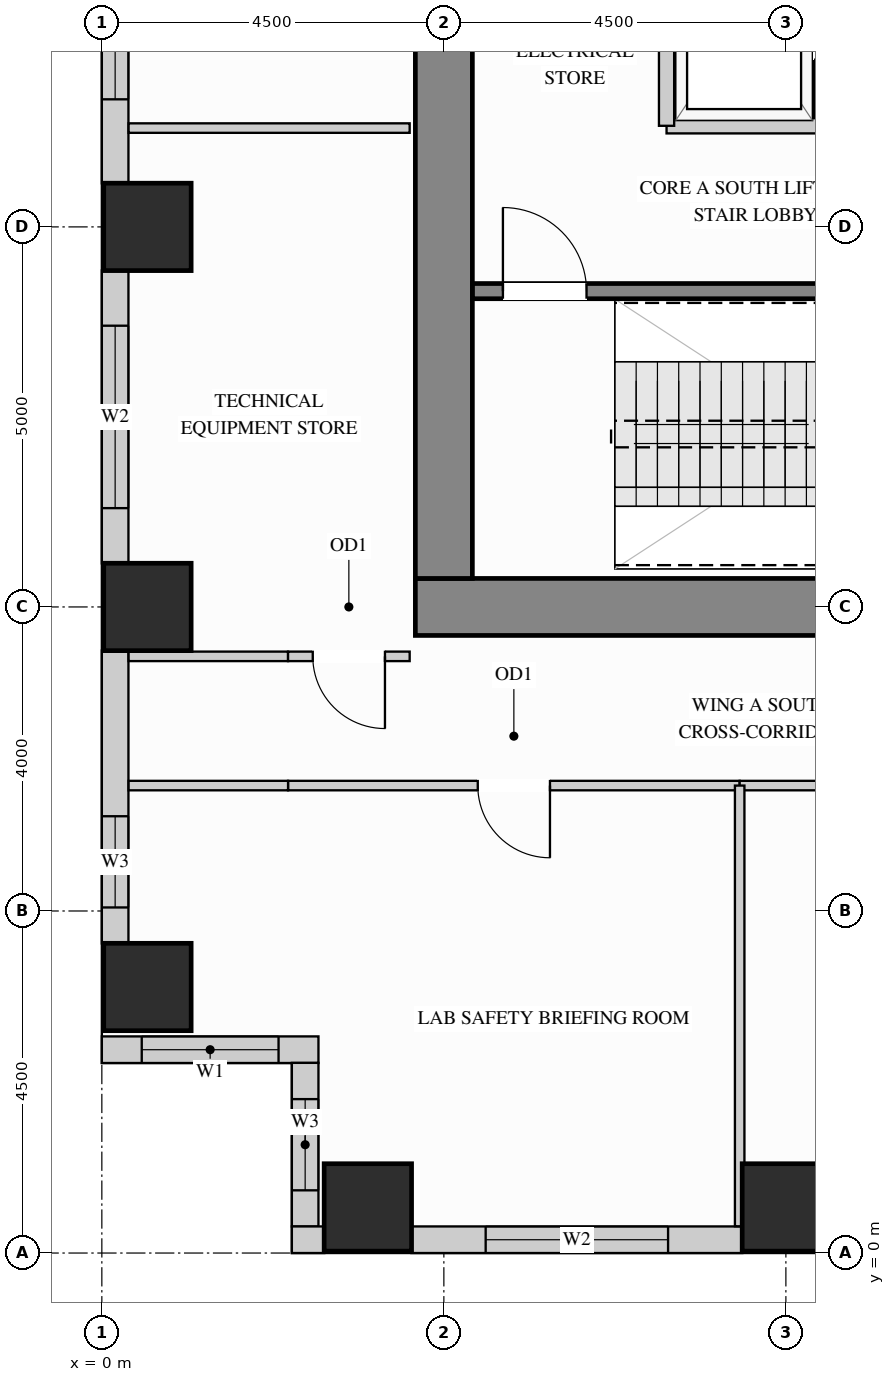
"""IFC4 building model, lengths in metres.
Left out: names, types, materials, properties, quantities, classifications, styles, units other than length and angle.
Written with IfcOpenShell. Run it as: python <this file> out.ifc"""

import sys

from ifc_helpers import new_model, si_unit, direction, frame, frame_2d, origin, origin_2d, place, context, subcontext, project, spatial, rectangle, extrude, source, transform, mapped, element, fill, save


model = new_model("IFC4")
c1 = context("Model", 3, precision=1e-05, world=origin(), true_north=direction((0.0, 1.0)))
c2 = subcontext(c1, "Body", "Model", "MODEL_VIEW")
j1 = project(units=[si_unit("LENGTHUNIT", "METRE"), si_unit("PLANEANGLEUNIT", "RADIAN")], contexts=[c1])
p1 = place(None, origin())
s1 = spatial("IfcSite", under=j1, at=p1, CompositionType="ELEMENT")
p2 = place(p1, origin())
s2 = spatial("IfcBuilding", under=s1, at=p2, CompositionType="ELEMENT")
p3 = place(p2, frame((0.0, 0.0, 120.6)))
s3 = spatial("IfcBuildingStorey", under=s2, at=p3, CompositionType="ELEMENT", Elevation=120.6)
m1 = source(origin(), c2, "Body", "SweptSolid", [
    extrude(rectangle(XDim=1.15, YDim=1.15, at=origin_2d()), origin(), (0.0, 0.0, 1.0), 3.38),
])
for number, where, z_axis, x_axis in (
    (1, (3.5, 0.6, 0.0), (0.0, 0.0, 1.0), (1.0, 0.0, 0.0)),
    (2, (9.0, 0.6, 0.0), (0.0, 0.0, 1.0), (1.0, 0.0, 0.0)),
    (3, (0.6, 13.5, 0.0), (0.0, 0.0, 1.0), (1.0, 0.0, 0.0)),
    (4, (0.6, 3.5, 0.0), (0.0, 0.0, 1.0), (1.0, 0.0, 0.0)),
    (5, (0.6, 8.5, 0.0), (0.0, 0.0, 1.0), (1.0, 0.0, 0.0)),
):
    element("IfcColumn", number, at=place(p3, frame(where, z_axis=z_axis, x_axis=x_axis)), inside=s3, PredefinedType="COLUMN", context=c2, shape_type="MappedRepresentation", body=[
        mapped(m1, transform((0.0, 0.0, 0.0), x_axis=(1.0, 0.0, 0.0), y_axis=(0.0, 1.0, 0.0), z_axis=(0.0, 0.0, 1.0))),
    ])
m2 = source(origin(), c2, "Body", "SweptSolid", [
    extrude(rectangle(XDim=10.75, YDim=0.75, at=frame_2d((5.375, 0.0))), origin(), (0.0, 0.0, 1.0), 3.38),
])
p4 = place(p3, frame((4.125, 8.5, 0.0), z_axis=(0.0, 0.0, 1.0), x_axis=(1.0, 0.0, 0.0)))
e6 = element("IfcWall", 6, at=p4, inside=s3, PredefinedType="SHEAR", context=c2, shape_type="MappedRepresentation", body=[
    mapped(m2, transform((0.0, 0.0, 0.0), x_axis=(1.0, 0.0, 0.0), y_axis=(0.0, 1.0, 0.0), z_axis=(0.0, 0.0, 1.0))),
])
m3 = source(origin(), c2, "Body", "SweptSolid", [
    extrude(rectangle(XDim=20.25, YDim=0.75, at=frame_2d((10.125, 0.0))), origin(), (0.0, 0.0, 1.0), 3.38),
])
p5 = place(p3, frame((4.5, 8.875, 0.0), z_axis=(0.0, 0.0, 1.0), x_axis=(0.0, 1.0, 0.0)))
e7 = element("IfcWall", 7, at=p5, inside=s3, PredefinedType="SHEAR", context=c2, shape_type="MappedRepresentation", body=[
    mapped(m3, transform((0.0, 0.0, 0.0), x_axis=(1.0, 0.0, 0.0), y_axis=(0.0, 1.0, 0.0), z_axis=(0.0, 0.0, 1.0))),
])
p6 = place(p3, frame((0.175, 17.427, 0.0), z_axis=(0.0, 0.0, 1.0), x_axis=(0.0, -1.0, 0.0)))
e8 = element("IfcWall", 8, at=p6, inside=s3, PredefinedType="SOLIDWALL", context=c2, shape_type="SweptSolid", body=[
    extrude(rectangle(XDim=3.354, YDim=0.35, at=frame_2d((1.677, 0.0))), origin(), (0.0, 0.0, 1.0), 3.365),
])
p7 = place(p6, frame((0.448, 0.0, 0.78)))
e9 = element("IfcOpeningElement", 9, at=p7, cuts=e8, PredefinedType="OPENING", context=c2, shape_type="SweptSolid", body=[
    extrude(rectangle(XDim=1.8, YDim=2.1, at=frame_2d((0.9, 1.05))), frame((0.0, 0.185, 0.0), z_axis=(0.0, -1.0, 0.0), x_axis=(1.0, 0.0, 0.0)), (0.0, 0.0, 1.0), 0.37),
])
p8 = place(p3, frame((0.175, 12.927, 0.0), z_axis=(0.0, 0.0, 1.0), x_axis=(0.0, -1.0, 0.0)))
e10 = element("IfcWall", 10, at=p8, inside=s3, PredefinedType="SOLIDWALL", context=c2, shape_type="SweptSolid", body=[
    extrude(rectangle(XDim=3.854, YDim=0.35, at=frame_2d((1.927, 0.0))), origin(), (0.0, 0.0, 1.0), 3.365),
])
p9 = place(p8, frame((0.727, 0.0, 0.78)))
e11 = element("IfcOpeningElement", 11, at=p9, cuts=e10, PredefinedType="OPENING", context=c2, shape_type="SweptSolid", body=[
    extrude(rectangle(XDim=2.4, YDim=2.1, at=frame_2d((1.2, 1.05))), frame((0.0, 0.185, 0.0), z_axis=(0.0, -1.0, 0.0), x_axis=(1.0, 0.0, 0.0)), (0.0, 0.0, 1.0), 0.37),
])
p10 = place(p3, frame((0.175, 7.927, 0.0), z_axis=(0.0, 0.0, 1.0), x_axis=(0.0, -1.0, 0.0)))
e12 = element("IfcWall", 12, at=p10, inside=s3, PredefinedType="SOLIDWALL", context=c2, shape_type="SweptSolid", body=[
    extrude(rectangle(XDim=3.854, YDim=0.35, at=frame_2d((1.927, 0.0))), origin(), (0.0, 0.0, 1.0), 3.365),
])
p11 = place(p10, frame((2.18, 0.0, 0.78)))
e13 = element("IfcOpeningElement", 13, at=p11, cuts=e12, PredefinedType="OPENING", context=c2, shape_type="SweptSolid", body=[
    extrude(rectangle(XDim=1.2, YDim=2.1, at=frame_2d((0.6, 1.05))), frame((0.0, 0.185, 0.0), z_axis=(0.0, -1.0, 0.0), x_axis=(1.0, 0.0, 0.0)), (0.0, 0.0, 1.0), 0.37),
])
p12 = place(p3, frame((0.0, 2.675, 0.0), z_axis=(0.0, 0.0, 1.0), x_axis=(1.0, 0.0, 0.0)))
e14 = element("IfcWall", 14, at=p12, inside=s3, PredefinedType="SOLIDWALL", context=c2, shape_type="SweptSolid", body=[
    extrude(rectangle(XDim=2.85, YDim=0.35, at=frame_2d((1.425, 0.0))), origin(), (0.0, 0.0, 1.0), 3.365),
])
p13 = place(p12, frame((0.525, 0.0, 0.78)))
e15 = element("IfcOpeningElement", 15, at=p13, cuts=e14, PredefinedType="OPENING", context=c2, shape_type="SweptSolid", body=[
    extrude(rectangle(XDim=1.8, YDim=2.1, at=frame_2d((0.9, 1.05))), frame((0.0, 0.185, 0.0), z_axis=(0.0, -1.0, 0.0), x_axis=(1.0, 0.0, 0.0)), (0.0, 0.0, 1.0), 0.37),
])
p14 = place(p3, frame((2.675, 2.502, 0.0), z_axis=(0.0, 0.0, 1.0), x_axis=(0.0, -1.0, 0.0)))
e16 = element("IfcWall", 16, at=p14, inside=s3, PredefinedType="SOLIDWALL", context=c2, shape_type="SweptSolid", body=[
    extrude(rectangle(XDim=2.154, YDim=0.35, at=frame_2d((1.077, 0.0))), origin(), (0.0, 0.0, 1.0), 3.365),
])
p15 = place(p14, frame((0.477, 0.0, 0.78)))
e17 = element("IfcOpeningElement", 17, at=p15, cuts=e16, PredefinedType="OPENING", context=c2, shape_type="SweptSolid", body=[
    extrude(rectangle(XDim=1.2, YDim=2.1, at=frame_2d((0.6, 1.05))), frame((0.0, 0.185, 0.0), z_axis=(0.0, -1.0, 0.0), x_axis=(1.0, 0.0, 0.0)), (0.0, 0.0, 1.0), 0.37),
])
m4 = source(origin(), c2, "Body", "SweptSolid", [
    extrude(rectangle(XDim=0.427, YDim=0.35, at=frame_2d((0.213, 0.0))), origin(), (0.0, 0.0, 1.0), 3.365),
])
p16 = place(p3, frame((2.5, 0.175, 0.0), z_axis=(0.0, 0.0, 1.0), x_axis=(1.0, 0.0, 0.0)))
e18 = element("IfcWall", 18, at=p16, inside=s3, PredefinedType="SOLIDWALL", context=c2, shape_type="MappedRepresentation", body=[
    mapped(m4, transform((0.0, 0.0, 0.0), x_axis=(1.0, 0.0, 0.0), y_axis=(0.0, 1.0, 0.0), z_axis=(0.0, 0.0, 1.0))),
])
p17 = place(p3, frame((4.073, 0.175, 0.0), z_axis=(0.0, 0.0, 1.0), x_axis=(1.0, 0.0, 0.0)))
e19 = element("IfcWall", 19, at=p17, inside=s3, PredefinedType="SOLIDWALL", context=c2, shape_type="SweptSolid", body=[
    extrude(rectangle(XDim=4.354, YDim=0.35, at=frame_2d((2.177, 0.0))), origin(), (0.0, 0.0, 1.0), 3.365),
])
p18 = place(p17, frame((0.977, 0.0, 0.78)))
e20 = element("IfcOpeningElement", 20, at=p18, cuts=e19, PredefinedType="OPENING", context=c2, shape_type="SweptSolid", body=[
    extrude(rectangle(XDim=2.4, YDim=2.1, at=frame_2d((1.2, 1.05))), frame((0.0, 0.185, 0.0), z_axis=(0.0, -1.0, 0.0), x_axis=(1.0, 0.0, 0.0)), (0.0, 0.0, 1.0), 0.37),
])
m5 = source(origin(), c2, "Body", "SweptSolid", [
    extrude(rectangle(XDim=2.098, YDim=0.125, at=frame_2d((1.049, 0.0))), origin(), (0.0, 0.0, 1.0), 3.365),
])
p19 = place(p3, frame((0.352, 7.85, 0.0), z_axis=(0.0, 0.0, 1.0), x_axis=(1.0, 0.0, 0.0)))
e21 = element("IfcWall", 21, at=p19, inside=s3, PredefinedType="PARTITIONING", context=c2, shape_type="MappedRepresentation", body=[
    mapped(m5, transform((0.0, 0.0, 0.0), x_axis=(1.0, 0.0, 0.0), y_axis=(0.0, 1.0, 0.0), z_axis=(0.0, 0.0, 1.0))),
])
p20 = place(p3, frame((2.45, 7.85, 0.0), z_axis=(0.0, 0.0, 1.0), x_axis=(1.0, 0.0, 0.0)))
e22 = element("IfcWall", 22, at=p20, inside=s3, PredefinedType="PARTITIONING", context=c2, shape_type="SweptSolid", body=[
    extrude(rectangle(XDim=1.6, YDim=0.125, at=frame_2d((0.8, 0.0))), origin(), (0.0, 0.0, 1.0), 3.365),
])
p21 = place(p20, frame((0.325, 0.0, 0.0)))
e23 = element("IfcOpeningElement", 23, at=p21, cuts=e22, PredefinedType="OPENING", context=c2, shape_type="SweptSolid", body=[
    extrude(rectangle(XDim=0.95, YDim=2.15, at=frame_2d((0.475, 1.075))), frame((0.0, 0.073, 0.0), z_axis=(0.0, -1.0, 0.0), x_axis=(1.0, 0.0, 0.0)), (0.0, 0.0, 1.0), 0.145),
])
p22 = place(p3, frame((2.45, 6.15, 0.0), z_axis=(0.0, 0.0, 1.0), x_axis=(1.0, 0.0, 0.0)))
e24 = element("IfcWall", 24, at=p22, inside=s3, PredefinedType="PARTITIONING", context=c2, shape_type="SweptSolid", body=[
    extrude(rectangle(XDim=5.942, YDim=0.125, at=frame_2d((2.971, 0.0))), origin(), (0.0, 0.0, 1.0), 3.365),
])
p23 = place(p22, frame((2.496, 0.0, 0.0)))
e25 = element("IfcOpeningElement", 25, at=p23, cuts=e24, PredefinedType="OPENING", context=c2, shape_type="SweptSolid", body=[
    extrude(rectangle(XDim=0.95, YDim=2.15, at=frame_2d((0.475, 1.075))), frame((0.0, 0.073, 0.0), z_axis=(0.0, -1.0, 0.0), x_axis=(1.0, 0.0, 0.0)), (0.0, 0.0, 1.0), 0.145),
])
p24 = place(p3, frame((8.392, 6.15, 0.0), z_axis=(0.0, 0.0, 1.0), x_axis=(1.0, 0.0, 0.0)))
e26 = element("IfcWall", 26, at=p24, inside=s3, PredefinedType="PARTITIONING", context=c2, shape_type="SweptSolid", body=[
    extrude(rectangle(XDim=5.627, YDim=0.125, at=frame_2d((2.813, 0.0))), origin(), (0.0, 0.0, 1.0), 3.365),
])
p25 = place(p24, frame((2.338, 0.0, 0.0)))
e27 = element("IfcOpeningElement", 27, at=p25, cuts=e26, PredefinedType="OPENING", context=c2, shape_type="SweptSolid", body=[
    extrude(rectangle(XDim=0.95, YDim=2.15, at=frame_2d((0.475, 1.075))), frame((0.0, 0.073, 0.0), z_axis=(0.0, -1.0, 0.0), x_axis=(1.0, 0.0, 0.0)), (0.0, 0.0, 1.0), 0.145),
])
p26 = place(p3, frame((0.352, 6.15, 0.0), z_axis=(0.0, 0.0, 1.0), x_axis=(1.0, 0.0, 0.0)))
e28 = element("IfcWall", 28, at=p26, inside=s3, PredefinedType="PARTITIONING", context=c2, shape_type="MappedRepresentation", body=[
    mapped(m5, transform((0.0, 0.0, 0.0), x_axis=(1.0, 0.0, 0.0), y_axis=(0.0, 1.0, 0.0), z_axis=(0.0, 0.0, 1.0))),
])
m6 = source(origin(), c2, "Body", "SweptSolid", [
    extrude(rectangle(XDim=5.798, YDim=0.125, at=frame_2d((2.899, 0.0))), origin(), (0.0, 0.0, 1.0), 3.365),
])
p27 = place(p3, frame((8.392, 0.352, 0.0), z_axis=(0.0, 0.0, 1.0), x_axis=(0.0, 1.0, 0.0)))
e29 = element("IfcWall", 29, at=p27, inside=s3, PredefinedType="PARTITIONING", context=c2, shape_type="MappedRepresentation", body=[
    mapped(m6, transform((0.0, 0.0, 0.0), x_axis=(1.0, 0.0, 0.0), y_axis=(0.0, 1.0, 0.0), z_axis=(0.0, 0.0, 1.0))),
])
m7 = source(origin(), c2, "Body", "SweptSolid", [
    extrude(rectangle(XDim=3.698, YDim=0.125, at=frame_2d((1.849, 0.0))), origin(), (0.0, 0.0, 1.0), 3.365),
])
p28 = place(p3, frame((0.352, 14.8, 0.0), z_axis=(0.0, 0.0, 1.0), x_axis=(1.0, 0.0, 0.0)))
e30 = element("IfcWall", 30, at=p28, inside=s3, PredefinedType="PARTITIONING", context=c2, shape_type="MappedRepresentation", body=[
    mapped(m7, transform((0.0, 0.0, 0.0), x_axis=(1.0, 0.0, 0.0), y_axis=(0.0, 1.0, 0.0), z_axis=(0.0, 0.0, 1.0))),
])
p29 = place(p3, frame((9.47, 14.83, 0.0), z_axis=(0.0, 0.0, 1.0), x_axis=(0.0, 1.0, 0.0)))
e31 = element("IfcWall", 31, at=p29, inside=s3, PredefinedType="PARTITIONING", context=c2, shape_type="SweptSolid", body=[
    extrude(rectangle(XDim=2.84, YDim=0.2, at=frame_2d((1.42, 0.0))), origin(), (0.0, 0.0, 1.0), 3.365),
])
p30 = place(p29, frame((0.87, 0.0, 0.0)))
e32 = element("IfcOpeningElement", 32, at=p30, cuts=e31, PredefinedType="OPENING", context=c2, shape_type="SweptSolid", body=[
    extrude(rectangle(XDim=1.1, YDim=2.2, at=frame_2d((0.55, 1.1))), frame((0.0, 0.11, 0.0), z_axis=(0.0, -1.0, 0.0), x_axis=(1.0, 0.0, 0.0)), (0.0, 0.0, 1.0), 0.22),
])
m8 = source(origin(), c2, "Body", "SweptSolid", [
    extrude(rectangle(XDim=2.04, YDim=0.2, at=frame_2d((1.02, 0.0))), origin(), (0.0, 0.0, 1.0), 3.365),
])
p31 = place(p3, frame((7.43, 14.83, 0.0), z_axis=(0.0, 0.0, 1.0), x_axis=(1.0, 0.0, 0.0)))
e33 = element("IfcWall", 33, at=p31, inside=s3, PredefinedType="PARTITIONING", context=c2, shape_type="MappedRepresentation", body=[
    mapped(m8, transform((0.0, 0.0, 0.0), x_axis=(1.0, 0.0, 0.0), y_axis=(0.0, 1.0, 0.0), z_axis=(0.0, 0.0, 1.0))),
])
m9 = source(origin(), c2, "Body", "SweptSolid", [
    extrude(rectangle(XDim=2.84, YDim=0.2, at=frame_2d((1.42, 0.0))), origin(), (0.0, 0.0, 1.0), 3.365),
])
p32 = place(p3, frame((7.43, 14.83, 0.0), z_axis=(0.0, 0.0, 1.0), x_axis=(0.0, 1.0, 0.0)))
e34 = element("IfcWall", 34, at=p32, inside=s3, PredefinedType="PARTITIONING", context=c2, shape_type="MappedRepresentation", body=[
    mapped(m9, transform((0.0, 0.0, 0.0), x_axis=(1.0, 0.0, 0.0), y_axis=(0.0, 1.0, 0.0), z_axis=(0.0, 0.0, 1.0))),
])
p33 = place(p3, frame((4.877, 12.655, 0.0), z_axis=(0.0, 0.0, 1.0), x_axis=(1.0, 0.0, 0.0)))
e35 = element("IfcWall", 35, at=p33, inside=s3, PredefinedType="SHEAR", context=c2, shape_type="SweptSolid", body=[
    extrude(rectangle(XDim=7.528, YDim=0.2, at=frame_2d((3.764, 0.0))), origin(), (0.0, 0.0, 1.0), 3.38),
])
p34 = place(p33, frame((0.4, 0.0, 0.0)))
e36 = element("IfcOpeningElement", 36, at=p34, cuts=e35, PredefinedType="OPENING", context=c2, shape_type="SweptSolid", body=[
    extrude(rectangle(XDim=1.1, YDim=2.15, at=frame_2d((0.55, 1.075))), frame((0.0, 0.11, 0.0), z_axis=(0.0, -1.0, 0.0), x_axis=(1.0, 0.0, 0.0)), (0.0, 0.0, 1.0), 0.22),
])
m10 = source(origin(), c2, "Body", "SweptSolid", [
    extrude(rectangle(XDim=0.95, YDim=2.15, at=frame_2d((0.475, 1.075))), frame((0.0, 0.025, 0.0), z_axis=(0.0, -1.0, 0.0), x_axis=(1.0, 0.0, 0.0)), (0.0, 0.0, 1.0), 0.05),
])
p35 = place(p23, origin())
e37 = element("IfcDoor", 37, at=p35, inside=s3, OperationType="SINGLE_SWING_RIGHT", PredefinedType="DOOR", context=c2, shape_type="MappedRepresentation", body=[
    mapped(m10, transform((0.0, 0.0, 0.0), x_axis=(1.0, 0.0, 0.0), y_axis=(0.0, 1.0, 0.0), z_axis=(0.0, 0.0, 1.0))),
])
fill(e25, e37)
p36 = place(p21, origin())
e38 = element("IfcDoor", 38, at=p36, inside=s3, OperationType="SINGLE_SWING_RIGHT", PredefinedType="DOOR", context=c2, shape_type="MappedRepresentation", body=[
    mapped(m10, transform((0.0, 0.0, 0.0), x_axis=(1.0, 0.0, 0.0), y_axis=(0.0, 1.0, 0.0), z_axis=(0.0, 0.0, 1.0))),
])
fill(e23, e38)
m11 = source(origin(), c2, "Body", "SweptSolid", [
    extrude(rectangle(XDim=1.1, YDim=2.15, at=frame_2d((0.55, 1.075))), frame((0.0, 0.025, 0.0), z_axis=(0.0, -1.0, 0.0), x_axis=(1.0, 0.0, 0.0)), (0.0, 0.0, 1.0), 0.05),
])
p37 = place(p34, origin())
e39 = element("IfcDoor", 39, at=p37, inside=s3, OperationType="SINGLE_SWING_LEFT", PredefinedType="DOOR", context=c2, shape_type="MappedRepresentation", body=[
    mapped(m11, transform((0.0, 0.0, 0.0), x_axis=(1.0, 0.0, 0.0), y_axis=(0.0, 1.0, 0.0), z_axis=(0.0, 0.0, 1.0))),
])
fill(e36, e39)
m12 = source(origin(), c2, "Body", "SweptSolid", [
    extrude(rectangle(XDim=1.8, YDim=2.1, at=frame_2d((0.9, 1.05))), frame((0.0, 0.03, 0.0), z_axis=(0.0, -1.0, 0.0), x_axis=(1.0, 0.0, 0.0)), (0.0, 0.0, 1.0), 0.06),
])
p38 = place(p7, origin())
e40 = element("IfcWindow", 40, at=p38, inside=s3, PartitioningType="SINGLE_PANEL", PredefinedType="WINDOW", context=c2, shape_type="MappedRepresentation", body=[
    mapped(m12, transform((0.0, 0.0, 0.0), x_axis=(1.0, 0.0, 0.0), y_axis=(0.0, 1.0, 0.0), z_axis=(0.0, 0.0, 1.0))),
])
fill(e9, e40)
p39 = place(p13, origin())
e41 = element("IfcWindow", 41, at=p39, inside=s3, PartitioningType="SINGLE_PANEL", PredefinedType="WINDOW", context=c2, shape_type="MappedRepresentation", body=[
    mapped(m12, transform((0.0, 0.0, 0.0), x_axis=(1.0, 0.0, 0.0), y_axis=(0.0, 1.0, 0.0), z_axis=(0.0, 0.0, 1.0))),
])
fill(e15, e41)
m13 = source(origin(), c2, "Body", "SweptSolid", [
    extrude(rectangle(XDim=2.4, YDim=2.1, at=frame_2d((1.2, 1.05))), frame((0.0, 0.03, 0.0), z_axis=(0.0, -1.0, 0.0), x_axis=(1.0, 0.0, 0.0)), (0.0, 0.0, 1.0), 0.06),
])
p40 = place(p9, origin())
e42 = element("IfcWindow", 42, at=p40, inside=s3, PartitioningType="SINGLE_PANEL", PredefinedType="WINDOW", context=c2, shape_type="MappedRepresentation", body=[
    mapped(m13, transform((0.0, 0.0, 0.0), x_axis=(1.0, 0.0, 0.0), y_axis=(0.0, 1.0, 0.0), z_axis=(0.0, 0.0, 1.0))),
])
fill(e11, e42)
p41 = place(p18, origin())
e43 = element("IfcWindow", 43, at=p41, inside=s3, PartitioningType="SINGLE_PANEL", PredefinedType="WINDOW", context=c2, shape_type="MappedRepresentation", body=[
    mapped(m13, transform((0.0, 0.0, 0.0), x_axis=(1.0, 0.0, 0.0), y_axis=(0.0, 1.0, 0.0), z_axis=(0.0, 0.0, 1.0))),
])
fill(e20, e43)
m14 = source(origin(), c2, "Body", "SweptSolid", [
    extrude(rectangle(XDim=1.2, YDim=2.1, at=frame_2d((0.6, 1.05))), frame((0.0, 0.03, 0.0), z_axis=(0.0, -1.0, 0.0), x_axis=(1.0, 0.0, 0.0)), (0.0, 0.0, 1.0), 0.06),
])
p42 = place(p11, origin())
e44 = element("IfcWindow", 44, at=p42, inside=s3, PartitioningType="SINGLE_PANEL", PredefinedType="WINDOW", context=c2, shape_type="MappedRepresentation", body=[
    mapped(m14, transform((0.0, 0.0, 0.0), x_axis=(1.0, 0.0, 0.0), y_axis=(0.0, 1.0, 0.0), z_axis=(0.0, 0.0, 1.0))),
])
fill(e13, e44)
p43 = place(p15, origin())
e45 = element("IfcWindow", 45, at=p43, inside=s3, PartitioningType="SINGLE_PANEL", PredefinedType="WINDOW", context=c2, shape_type="MappedRepresentation", body=[
    mapped(m14, transform((0.0, 0.0, 0.0), x_axis=(1.0, 0.0, 0.0), y_axis=(0.0, 1.0, 0.0), z_axis=(0.0, 0.0, 1.0))),
])
fill(e17, e45)
save(model, sys.argv[1])
